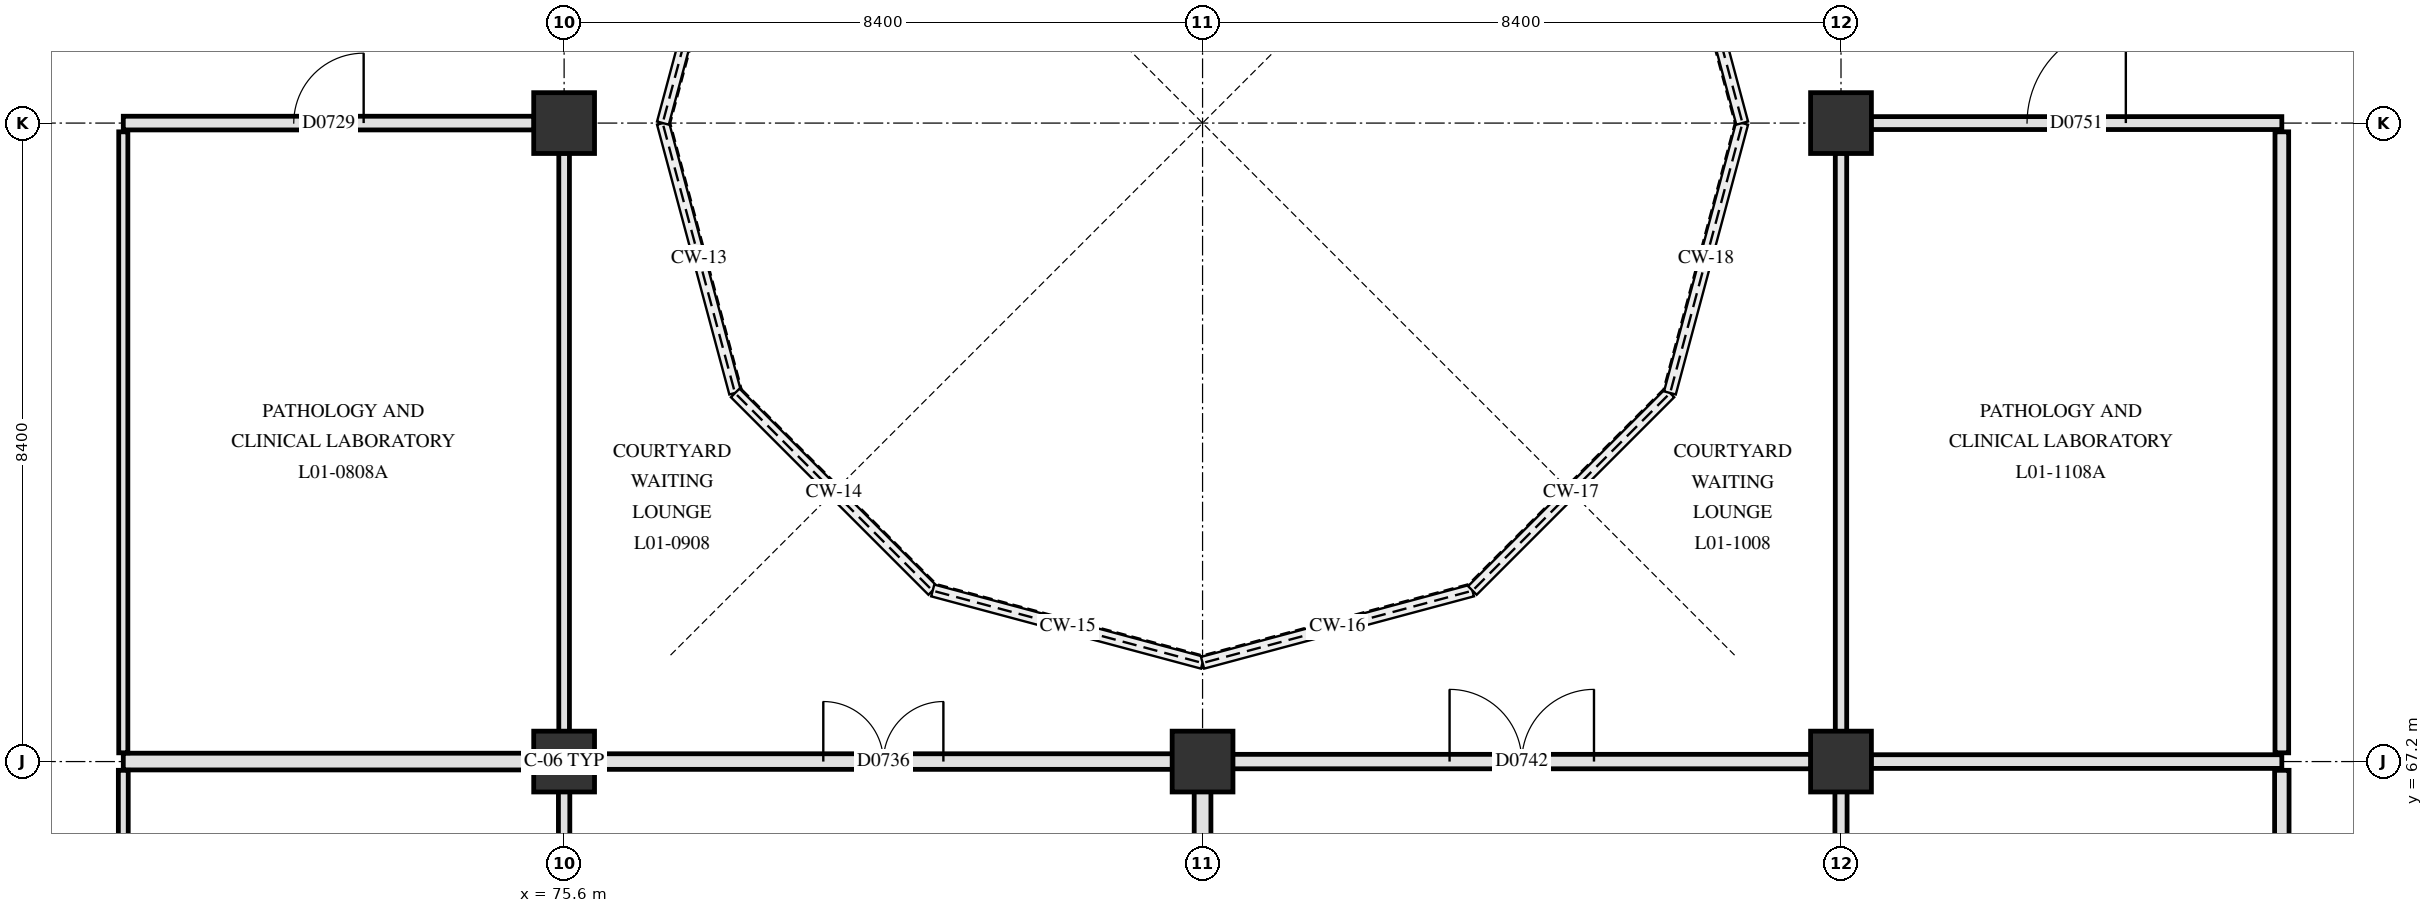
"""IFC4 building model, lengths in metres.
Left out: names, types, materials, properties, quantities, classifications, styles, units other than length and angle.
Written with IfcOpenShell. Run it as: python <this file> out.ifc"""

import sys

from ifc_helpers import new_model, si_unit, direction, frame, frame_2d, origin, origin_2d, place, context, subcontext, project, spatial, rectangle, circle, extrude, element, fill, save


model = new_model("IFC4")
c1 = context("Model", 3, precision=1e-05, world=origin(), true_north=direction((0.0, 1.0)))
c2 = subcontext(c1, "Body", "Model", "MODEL_VIEW")
j1 = project(units=[si_unit("LENGTHUNIT", "METRE"), si_unit("PLANEANGLEUNIT", "RADIAN")], contexts=[c1])
p1 = place(None, origin())
s1 = spatial("IfcSite", under=j1, at=p1, CompositionType="ELEMENT")
p2 = place(p1, origin())
s2 = spatial("IfcBuilding", under=s1, at=p2, CompositionType="ELEMENT")
p3 = place(p2, frame((0.0, 0.0, 4.8)))
s3 = spatial("IfcBuildingStorey", under=s2, at=p3, CompositionType="ELEMENT", Elevation=4.8)
for number, where, z_axis, x_axis in (
    (1, (75.6, 67.2, 0.0), (0.0, 0.0, 1.0), (1.0, 0.0, 0.0)),
    (2, (75.6, 75.6, 0.0), (0.0, 0.0, 1.0), (1.0, 0.0, 0.0)),
    (3, (84.0, 67.2, 0.0), (0.0, 0.0, 1.0), (1.0, 0.0, 0.0)),
    (4, (92.4, 67.2, 0.0), (0.0, 0.0, 1.0), (1.0, 0.0, 0.0)),
    (5, (92.4, 75.6, 0.0), (0.0, 0.0, 1.0), (1.0, 0.0, 0.0)),
):
    element("IfcColumn", number, at=place(p3, frame(where, z_axis=z_axis, x_axis=x_axis)), inside=s3, PredefinedType="COLUMN", context=c2, shape_type="SweptSolid", body=[
        extrude(circle(Radius=0.4, at=origin_2d()), origin(), (0.0, 0.0, 1.0), 4.5),
    ])
p4 = place(p3, frame((69.8, 67.2, 0.0), z_axis=(0.0, 0.0, 1.0), x_axis=(1.0, 0.0, 0.0)))
e6 = element("IfcWall", 6, at=p4, inside=s3, PredefinedType="PARTITIONING", context=c2, shape_type="SweptSolid", body=[
    extrude(rectangle(XDim=5.405, YDim=0.22, at=frame_2d((2.703, 0.0))), origin(), (0.0, 0.0, 1.0), 3.54),
])
p5 = place(p3, frame((75.995, 67.2, 0.0), z_axis=(0.0, 0.0, 1.0), x_axis=(1.0, 0.0, 0.0)))
e7 = element("IfcWall", 7, at=p5, inside=s3, PredefinedType="PARTITIONING", context=c2, shape_type="SweptSolid", body=[
    extrude(rectangle(XDim=7.61, YDim=0.205, at=frame_2d((3.805, 0.0))), origin(), (0.0, 0.0, 1.0), 3.54),
])
p6 = place(p5, frame((3.015, 0.0, 0.0)))
e8 = element("IfcOpeningElement", 8, at=p6, cuts=e7, PredefinedType="OPENING", context=c2, shape_type="SweptSolid", body=[
    extrude(rectangle(XDim=1.58, YDim=2.22, at=frame_2d((0.79, 1.11))), frame((0.0, 0.113, 0.0), z_axis=(0.0, -1.0, 0.0), x_axis=(1.0, 0.0, 0.0)), (0.0, 0.0, 1.0), 0.225),
])
p7 = place(p3, frame((84.395, 67.2, 0.0), z_axis=(0.0, 0.0, 1.0), x_axis=(1.0, 0.0, 0.0)))
e9 = element("IfcWall", 9, at=p7, inside=s3, PredefinedType="PARTITIONING", context=c2, shape_type="SweptSolid", body=[
    extrude(rectangle(XDim=7.61, YDim=0.19, at=frame_2d((3.805, 0.0))), origin(), (0.0, 0.0, 1.0), 3.54),
])
p8 = place(p7, frame((2.855, 0.0, 0.0)))
e10 = element("IfcOpeningElement", 10, at=p8, cuts=e9, PredefinedType="OPENING", context=c2, shape_type="SweptSolid", body=[
    extrude(rectangle(XDim=1.9, YDim=2.3, at=frame_2d((0.95, 1.15))), frame((0.0, 0.105, 0.0), z_axis=(0.0, -1.0, 0.0), x_axis=(1.0, 0.0, 0.0)), (0.0, 0.0, 1.0), 0.21),
])
p9 = place(p3, frame((92.795, 67.2, 0.0), z_axis=(0.0, 0.0, 1.0), x_axis=(1.0, 0.0, 0.0)))
e11 = element("IfcWall", 11, at=p9, inside=s3, PredefinedType="PARTITIONING", context=c2, shape_type="SweptSolid", body=[
    extrude(rectangle(XDim=5.405, YDim=0.18, at=frame_2d((2.703, 0.0))), origin(), (0.0, 0.0, 1.0), 3.54),
])
p10 = place(p3, frame((69.8, 75.6, 0.0), z_axis=(0.0, 0.0, 1.0), x_axis=(1.0, 0.0, 0.0)))
e12 = element("IfcWall", 12, at=p10, inside=s3, PredefinedType="PARTITIONING", context=c2, shape_type="SweptSolid", body=[
    extrude(rectangle(XDim=5.405, YDim=0.18, at=frame_2d((2.703, 0.0))), origin(), (0.0, 0.0, 1.0), 3.54),
])
p11 = place(p10, frame((2.242, 0.0, 0.0)))
e13 = element("IfcOpeningElement", 13, at=p11, cuts=e12, PredefinedType="OPENING", context=c2, shape_type="SweptSolid", body=[
    extrude(rectangle(XDim=0.92, YDim=2.08, at=frame_2d((0.46, 1.04))), frame((0.0, 0.1, 0.0), z_axis=(0.0, -1.0, 0.0), x_axis=(1.0, 0.0, 0.0)), (0.0, 0.0, 1.0), 0.2),
])
p12 = place(p3, frame((92.795, 75.6, 0.0), z_axis=(0.0, 0.0, 1.0), x_axis=(1.0, 0.0, 0.0)))
e14 = element("IfcWall", 14, at=p12, inside=s3, PredefinedType="PARTITIONING", context=c2, shape_type="SweptSolid", body=[
    extrude(rectangle(XDim=5.405, YDim=0.17, at=frame_2d((2.703, 0.0))), origin(), (0.0, 0.0, 1.0), 3.54),
])
p13 = place(p12, frame((2.052, 0.0, 0.0)))
e15 = element("IfcOpeningElement", 15, at=p13, cuts=e14, PredefinedType="OPENING", context=c2, shape_type="SweptSolid", body=[
    extrude(rectangle(XDim=1.3, YDim=2.2, at=frame_2d((0.65, 1.1))), frame((0.0, 0.095, 0.0), z_axis=(0.0, -1.0, 0.0), x_axis=(1.0, 0.0, 0.0)), (0.0, 0.0, 1.0), 0.19),
])
p14 = place(p3, frame((69.8, 61.515, 0.0), z_axis=(0.0, 0.0, 1.0), x_axis=(0.0, 1.0, 0.0)))
e16 = element("IfcWall", 16, at=p14, inside=s3, PredefinedType="PARTITIONING", context=c2, shape_type="SweptSolid", body=[
    extrude(rectangle(XDim=5.57, YDim=0.13, at=frame_2d((2.785, 0.0))), origin(), (0.0, 0.0, 1.0), 3.54),
])
p15 = place(p3, frame((69.8, 67.315, 0.0), z_axis=(0.0, 0.0, 1.0), x_axis=(0.0, 1.0, 0.0)))
e17 = element("IfcWall", 17, at=p15, inside=s3, PredefinedType="PARTITIONING", context=c2, shape_type="SweptSolid", body=[
    extrude(rectangle(XDim=8.17, YDim=0.12, at=frame_2d((4.085, 0.0))), origin(), (0.0, 0.0, 1.0), 3.54),
])
p16 = place(p3, frame((75.6, 61.515, 0.0), z_axis=(0.0, 0.0, 1.0), x_axis=(0.0, 1.0, 0.0)))
e18 = element("IfcWall", 18, at=p16, inside=s3, PredefinedType="PARTITIONING", context=c2, shape_type="SweptSolid", body=[
    extrude(rectangle(XDim=5.29, YDim=0.15, at=frame_2d((2.645, 0.0))), origin(), (0.0, 0.0, 1.0), 3.59),
])
p17 = place(p3, frame((75.6, 67.595, 0.0), z_axis=(0.0, 0.0, 1.0), x_axis=(0.0, 1.0, 0.0)))
e19 = element("IfcWall", 19, at=p17, inside=s3, PredefinedType="PARTITIONING", context=c2, shape_type="SweptSolid", body=[
    extrude(rectangle(XDim=7.61, YDim=0.14, at=frame_2d((3.805, 0.0))), origin(), (0.0, 0.0, 1.0), 3.59),
])
p18 = place(p3, frame((84.0, 61.515, 0.0), z_axis=(0.0, 0.0, 1.0), x_axis=(0.0, 1.0, 0.0)))
e20 = element("IfcWall", 20, at=p18, inside=s3, PredefinedType="PARTITIONING", context=c2, shape_type="SweptSolid", body=[
    extrude(rectangle(XDim=5.29, YDim=0.22, at=frame_2d((2.645, 0.0))), origin(), (0.0, 0.0, 1.0), 3.59),
])
p19 = place(p3, frame((92.4, 61.515, 0.0), z_axis=(0.0, 0.0, 1.0), x_axis=(0.0, 1.0, 0.0)))
e21 = element("IfcWall", 21, at=p19, inside=s3, PredefinedType="PARTITIONING", context=c2, shape_type="SweptSolid", body=[
    extrude(rectangle(XDim=5.29, YDim=0.16, at=frame_2d((2.645, 0.0))), origin(), (0.0, 0.0, 1.0), 3.59),
])
p20 = place(p3, frame((92.4, 67.595, 0.0), z_axis=(0.0, 0.0, 1.0), x_axis=(0.0, 1.0, 0.0)))
e22 = element("IfcWall", 22, at=p20, inside=s3, PredefinedType="PARTITIONING", context=c2, shape_type="SweptSolid", body=[
    extrude(rectangle(XDim=7.61, YDim=0.15, at=frame_2d((3.805, 0.0))), origin(), (0.0, 0.0, 1.0), 3.59),
])
p21 = place(p3, frame((98.2, 61.515, 0.0), z_axis=(0.0, 0.0, 1.0), x_axis=(0.0, 1.0, 0.0)))
e23 = element("IfcWall", 23, at=p21, inside=s3, PredefinedType="PARTITIONING", context=c2, shape_type="SweptSolid", body=[
    extrude(rectangle(XDim=5.57, YDim=0.19, at=frame_2d((2.785, 0.0))), origin(), (0.0, 0.0, 1.0), 3.54),
])
p22 = place(p3, frame((98.2, 67.315, 0.0), z_axis=(0.0, 0.0, 1.0), x_axis=(0.0, 1.0, 0.0)))
e24 = element("IfcWall", 24, at=p22, inside=s3, PredefinedType="PARTITIONING", context=c2, shape_type="SweptSolid", body=[
    extrude(rectangle(XDim=8.17, YDim=0.18, at=frame_2d((4.085, 0.0))), origin(), (0.0, 0.0, 1.0), 3.54),
])
p23 = place(p11, origin())
e25 = element("IfcDoor", 25, at=p23, inside=s3, OperationType="SINGLE_SWING_RIGHT", PredefinedType="DOOR", context=c2, shape_type="SweptSolid", body=[
    extrude(rectangle(XDim=0.92, YDim=2.08, at=frame_2d((0.46, 1.04))), frame((0.0, 0.025, 0.0), z_axis=(0.0, -1.0, 0.0), x_axis=(1.0, 0.0, 0.0)), (0.0, 0.0, 1.0), 0.05),
])
fill(e13, e25)
p24 = place(p6, origin())
e26 = element("IfcDoor", 26, at=p24, inside=s3, OperationType="DOUBLE_SWING_LEFT", PredefinedType="DOOR", context=c2, shape_type="SweptSolid", body=[
    extrude(rectangle(XDim=1.58, YDim=2.22, at=frame_2d((0.79, 1.11))), frame((0.0, 0.025, 0.0), z_axis=(0.0, -1.0, 0.0), x_axis=(1.0, 0.0, 0.0)), (0.0, 0.0, 1.0), 0.05),
])
fill(e8, e26)
p25 = place(p8, origin())
e27 = element("IfcDoor", 27, at=p25, inside=s3, OperationType="DOUBLE_SWING_LEFT", PredefinedType="DOOR", context=c2, shape_type="SweptSolid", body=[
    extrude(rectangle(XDim=1.9, YDim=2.3, at=frame_2d((0.95, 1.15))), frame((0.0, 0.025, 0.0), z_axis=(0.0, -1.0, 0.0), x_axis=(1.0, 0.0, 0.0)), (0.0, 0.0, 1.0), 0.05),
])
fill(e10, e27)
p26 = place(p13, origin())
e28 = element("IfcDoor", 28, at=p26, inside=s3, OperationType="SINGLE_SWING_RIGHT", PredefinedType="DOOR", context=c2, shape_type="SweptSolid", body=[
    extrude(rectangle(XDim=1.3, YDim=2.2, at=frame_2d((0.65, 1.1))), frame((0.0, 0.025, 0.0), z_axis=(0.0, -1.0, 0.0), x_axis=(1.0, 0.0, 0.0)), (0.0, 0.0, 1.0), 0.05),
])
fill(e15, e28)
save(model, sys.argv[1])
